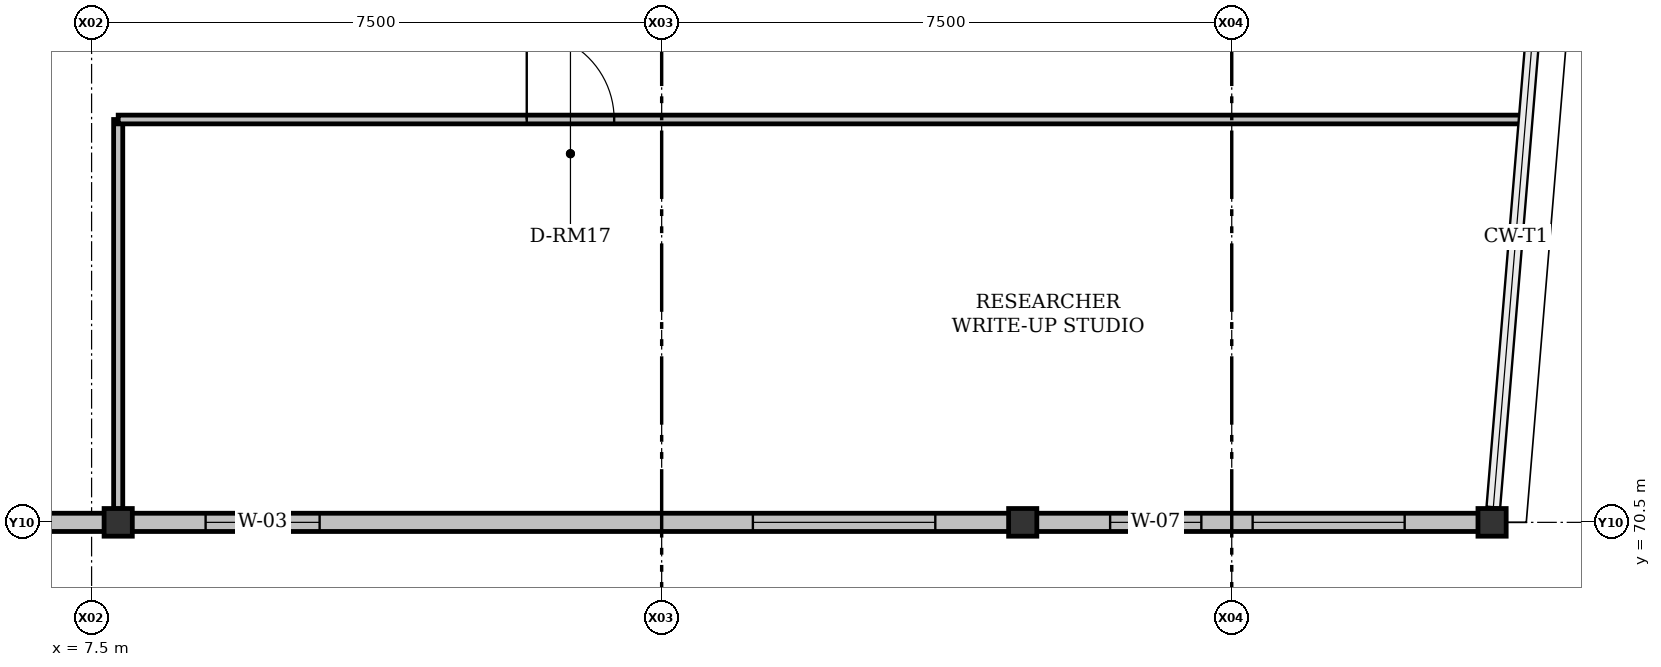
"""IFC4 building model, lengths in metres.
Left out: names, types, materials, properties, quantities, classifications, styles, units other than length and angle.
Written with IfcOpenShell. Run it as: python <this file> out.ifc"""

import sys

from ifc_helpers import new_model, si_unit, direction, frame, frame_2d, origin, origin_2d, place, context, subcontext, project, spatial, rectangle, i_section, extrude, element, fill, save


model = new_model("IFC4")
c1 = context("Model", 3, precision=1e-05, world=origin(), true_north=direction((0.0, 1.0)))
c2 = subcontext(c1, "Body", "Model", "MODEL_VIEW")
j1 = project(units=[si_unit("LENGTHUNIT", "METRE"), si_unit("PLANEANGLEUNIT", "RADIAN")], contexts=[c1])
p1 = place(None, origin())
s1 = spatial("IfcSite", under=j1, at=p1, CompositionType="ELEMENT")
p2 = place(p1, origin())
s2 = spatial("IfcBuilding", under=s1, at=p2, CompositionType="ELEMENT")
p3 = place(p2, frame((0.0, 0.0, 43.5)))
s3 = spatial("IfcBuildingStorey", under=s2, at=p3, CompositionType="ELEMENT", Elevation=43.5)
for number, where, z_axis, x_axis in (
    (1, (7.85, 70.5, 0.0), (0.0, 0.0, 1.0), (1.0, 0.0, 0.0)),
    (2, (19.75, 70.5, 0.0), (0.0, 0.0, 1.0), (1.0, 0.0, 0.0)),
    (3, (25.925, 70.5, 0.0), (0.0, 0.0, 1.0), (1.0, 0.0, 0.0)),
):
    element("IfcColumn", number, at=place(p3, frame(where, z_axis=z_axis, x_axis=x_axis)), inside=s3, PredefinedType="COLUMN", context=c2, shape_type="SweptSolid", body=[
        extrude(i_section(OverallWidth=0.371, OverallDepth=0.364, WebThickness=0.013, FlangeThickness=0.022, FilletRadius=0.015, at=origin_2d()), origin(), (0.0, 0.0, 1.0), 4.2),
    ])
p4 = place(p3, frame((7.85, 70.5, 0.0), z_axis=(0.0, 0.0, 1.0), x_axis=(-1.0, 0.0, 0.0)))
e4 = element("IfcWall", 4, at=p4, inside=s3, PredefinedType="SOLIDWALL", context=c2, shape_type="SweptSolid", body=[
    extrude(rectangle(XDim=7.3, YDim=0.24, at=frame_2d((3.65, 0.0))), origin(), (0.0, 0.0, 1.0), 3.552),
])
p5 = place(p4, frame((0.955, 0.0, 0.92)))
e5 = element("IfcOpeningElement", 5, at=p5, cuts=e4, PredefinedType="OPENING", context=c2, shape_type="SweptSolid", body=[
    extrude(rectangle(XDim=0.9, YDim=1.3, at=frame_2d((0.45, 0.65))), frame((0.0, 0.12, 0.0), z_axis=(0.0, -1.0, 0.0), x_axis=(1.0, 0.0, 0.0)), (0.0, 0.0, 1.0), 0.24),
])
p6 = place(p4, frame((4.02, 0.0, 0.92)))
e6 = element("IfcOpeningElement", 6, at=p6, cuts=e4, PredefinedType="OPENING", context=c2, shape_type="SweptSolid", body=[
    extrude(rectangle(XDim=1.05, YDim=1.3, at=frame_2d((0.525, 0.65))), frame((0.0, 0.12, 0.0), z_axis=(0.0, -1.0, 0.0), x_axis=(1.0, 0.0, 0.0)), (0.0, 0.0, 1.0), 0.24),
])
p7 = place(p3, frame((19.75, 70.5, 0.0), z_axis=(0.0, 0.0, 1.0), x_axis=(-1.0, 0.0, 0.0)))
e7 = element("IfcWall", 7, at=p7, inside=s3, PredefinedType="SOLIDWALL", context=c2, shape_type="SweptSolid", body=[
    extrude(rectangle(XDim=11.9, YDim=0.24, at=frame_2d((5.95, 0.0))), origin(), (0.0, 0.0, 1.0), 3.552),
])
p8 = place(p7, frame((1.15, 0.0, 0.92)))
e8 = element("IfcOpeningElement", 8, at=p8, cuts=e7, PredefinedType="OPENING", context=c2, shape_type="SweptSolid", body=[
    extrude(rectangle(XDim=2.4, YDim=1.7, at=frame_2d((1.2, 0.85))), frame((0.0, 0.12, 0.0), z_axis=(0.0, -1.0, 0.0), x_axis=(1.0, 0.0, 0.0)), (0.0, 0.0, 1.0), 0.24),
])
p9 = place(p7, frame((9.25, 0.0, 0.92)))
e9 = element("IfcOpeningElement", 9, at=p9, cuts=e7, PredefinedType="OPENING", context=c2, shape_type="SweptSolid", body=[
    extrude(rectangle(XDim=1.5, YDim=1.4, at=frame_2d((0.75, 0.7))), frame((0.0, 0.12, 0.0), z_axis=(0.0, -1.0, 0.0), x_axis=(1.0, 0.0, 0.0)), (0.0, 0.0, 1.0), 0.24),
])
p10 = place(p3, frame((25.925, 70.5, 0.0), z_axis=(0.0, 0.0, 1.0), x_axis=(-1.0, 0.0, 0.0)))
e10 = element("IfcWall", 10, at=p10, inside=s3, PredefinedType="SOLIDWALL", context=c2, shape_type="SweptSolid", body=[
    extrude(rectangle(XDim=6.175, YDim=0.24, at=frame_2d((3.087, 0.0))), origin(), (0.0, 0.0, 1.0), 2.765),
])
p11 = place(p10, frame((1.15, 0.0, 0.92)))
e11 = element("IfcOpeningElement", 11, at=p11, cuts=e10, PredefinedType="OPENING", context=c2, shape_type="SweptSolid", body=[
    extrude(rectangle(XDim=2.0, YDim=1.35, at=frame_2d((1.0, 0.675))), frame((0.0, 0.12, 0.0), z_axis=(0.0, -1.0, 0.0), x_axis=(1.0, 0.0, 0.0)), (0.0, 0.0, 1.0), 0.24),
])
p12 = place(p10, frame((3.825, 0.0, 0.92)))
e12 = element("IfcOpeningElement", 12, at=p12, cuts=e10, PredefinedType="OPENING", context=c2, shape_type="SweptSolid", body=[
    extrude(rectangle(XDim=1.2, YDim=1.55, at=frame_2d((0.6, 0.775))), frame((0.0, 0.12, 0.0), z_axis=(0.0, -1.0, 0.0), x_axis=(1.0, 0.0, 0.0)), (0.0, 0.0, 1.0), 0.24),
])
p13 = place(p3, frame((7.85, 70.677, 0.0), z_axis=(0.0, 0.0, 1.0), x_axis=(0.0, 1.0, 0.0)))
e13 = element("IfcWall", 13, at=p13, inside=s3, PredefinedType="PARTITIONING", context=c2, shape_type="SweptSolid", body=[
    extrude(rectangle(XDim=5.123, YDim=0.12, at=frame_2d((2.562, 0.0))), origin(), (0.0, 0.0, 1.0), 3.502),
])
p14 = place(p3, frame((7.85, 75.8, 0.0), z_axis=(0.0, 0.0, 1.0), x_axis=(1.0, 0.0, 0.0)))
e14 = element("IfcWall", 14, at=p14, inside=s3, PredefinedType="PARTITIONING", context=c2, shape_type="SweptSolid", body=[
    extrude(rectangle(XDim=18.565, YDim=0.115, at=frame_2d((9.282, 0.0))), origin(), (0.0, 0.0, 1.0), 3.502),
])
p15 = place(p14, frame((5.375, 0.0, 0.0)))
e15 = element("IfcOpeningElement", 15, at=p15, cuts=e14, PredefinedType="OPENING", context=c2, shape_type="SweptSolid", body=[
    extrude(rectangle(XDim=1.15, YDim=2.2, at=frame_2d((0.575, 1.1))), frame((0.0, 0.058, 0.0), z_axis=(0.0, -1.0, 0.0), x_axis=(1.0, 0.0, 0.0)), (0.0, 0.0, 1.0), 0.115),
])
p16 = place(p8, origin())
e16 = element("IfcWindow", 16, at=p16, inside=s3, PartitioningType="DOUBLE_PANEL_VERTICAL", PredefinedType="WINDOW", context=c2, shape_type="SweptSolid", body=[
    extrude(rectangle(XDim=2.4, YDim=1.7, at=frame_2d((1.2, 0.85))), frame((0.0, 0.03, 0.0), z_axis=(0.0, -1.0, 0.0), x_axis=(1.0, 0.0, 0.0)), (0.0, 0.0, 1.0), 0.06),
])
fill(e8, e16)
p17 = place(p9, origin())
e17 = element("IfcWindow", 17, at=p17, inside=s3, PartitioningType="SINGLE_PANEL", PredefinedType="WINDOW", context=c2, shape_type="SweptSolid", body=[
    extrude(rectangle(XDim=1.5, YDim=1.4, at=frame_2d((0.75, 0.7))), frame((0.0, 0.03, 0.0), z_axis=(0.0, -1.0, 0.0), x_axis=(1.0, 0.0, 0.0)), (0.0, 0.0, 1.0), 0.06),
])
fill(e9, e17)
p18 = place(p11, origin())
e18 = element("IfcWindow", 18, at=p18, inside=s3, PartitioningType="DOUBLE_PANEL_VERTICAL", PredefinedType="WINDOW", context=c2, shape_type="SweptSolid", body=[
    extrude(rectangle(XDim=2.0, YDim=1.35, at=frame_2d((1.0, 0.675))), frame((0.0, 0.03, 0.0), z_axis=(0.0, -1.0, 0.0), x_axis=(1.0, 0.0, 0.0)), (0.0, 0.0, 1.0), 0.06),
])
fill(e11, e18)
p19 = place(p12, origin())
e19 = element("IfcWindow", 19, at=p19, inside=s3, PartitioningType="SINGLE_PANEL", PredefinedType="WINDOW", context=c2, shape_type="SweptSolid", body=[
    extrude(rectangle(XDim=1.2, YDim=1.55, at=frame_2d((0.6, 0.775))), frame((0.0, 0.03, 0.0), z_axis=(0.0, -1.0, 0.0), x_axis=(1.0, 0.0, 0.0)), (0.0, 0.0, 1.0), 0.06),
])
fill(e12, e19)
p20 = place(p15, origin())
e20 = element("IfcDoor", 20, at=p20, inside=s3, OperationType="SINGLE_SWING_LEFT", PredefinedType="DOOR", context=c2, shape_type="SweptSolid", body=[
    extrude(rectangle(XDim=1.15, YDim=2.2, at=frame_2d((0.575, 1.1))), frame((0.0, 0.025, 0.0), z_axis=(0.0, -1.0, 0.0), x_axis=(1.0, 0.0, 0.0)), (0.0, 0.0, 1.0), 0.05),
])
fill(e15, e20)
save(model, sys.argv[1])
